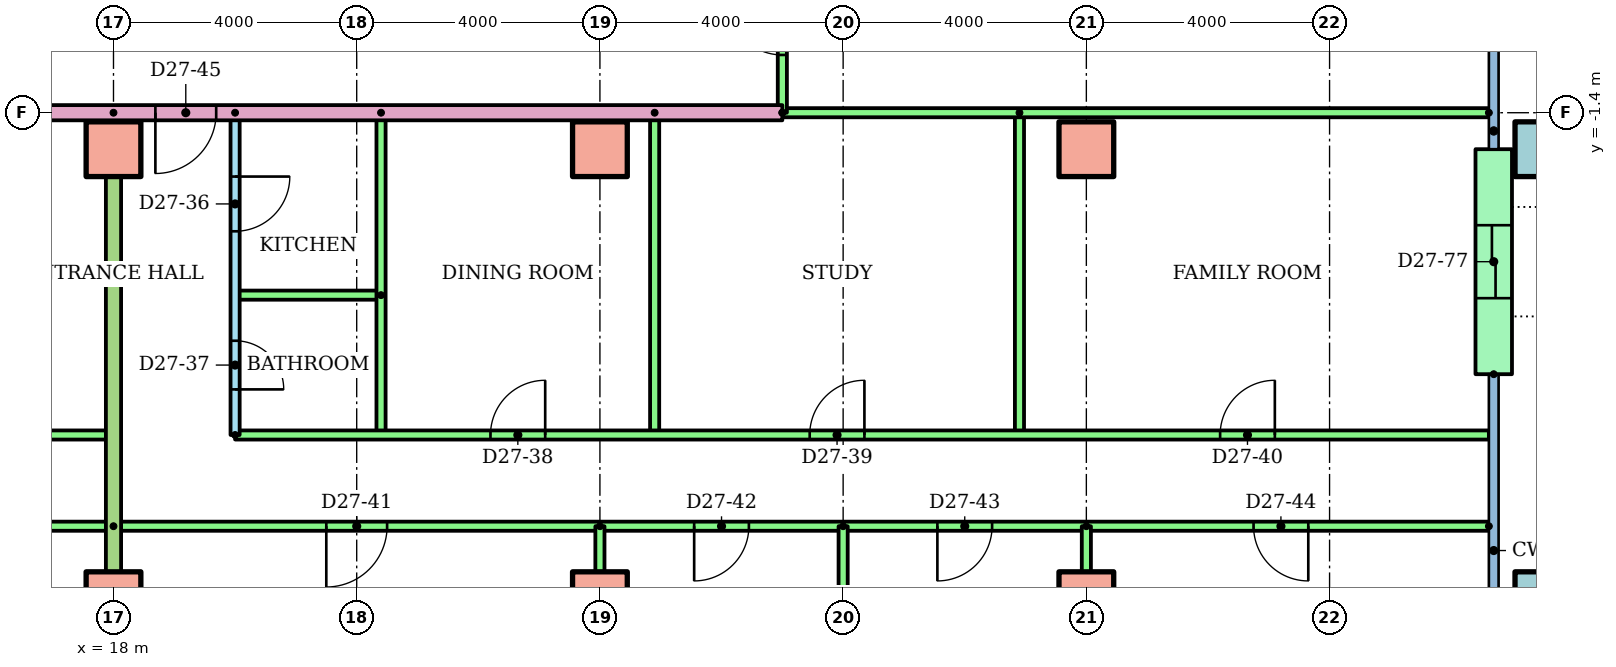
"""IFC4 building model, lengths in metres.
Left out: names, types, materials, properties, quantities, classifications, styles, units other than length and angle.
Written with IfcOpenShell. Run it as: python <this file> out.ifc"""

import sys

from ifc_helpers import new_model, si_unit, direction, frame, frame_2d, origin, origin_2d, place, context, subcontext, project, spatial, rectangle, hollow_rectangle, extrude, element, fill, save


model = new_model("IFC4")
c1 = context("Model", 3, precision=1e-05, world=origin(), true_north=direction((0.0, 1.0)))
c2 = subcontext(c1, "Body", "Model", "MODEL_VIEW")
j1 = project(units=[si_unit("LENGTHUNIT", "METRE"), si_unit("PLANEANGLEUNIT", "RADIAN")], contexts=[c1])
p1 = place(None, origin())
s1 = spatial("IfcSite", under=j1, at=p1, CompositionType="ELEMENT")
p2 = place(p1, origin())
s2 = spatial("IfcBuilding", under=s1, at=p2, CompositionType="ELEMENT")
p3 = place(p2, frame((0.0, 0.0, 103.1)))
s3 = spatial("IfcBuildingStorey", under=s2, at=p3, CompositionType="ELEMENT", Elevation=103.1)
for number, where in (
    (1, (18.0, -9.4, 0.0)),
    (2, (26.0, -9.4, 0.0)),
    (3, (34.0, -9.4, 0.0)),
):
    element("IfcColumn", number, at=place(p3, frame(where)), inside=s3, PredefinedType="COLUMN", context=c2, shape_type="SweptSolid", body=[
        extrude(rectangle(XDim=0.9, YDim=0.9, at=origin_2d()), origin(), (0.0, 0.0, 1.0), 3.2),
    ])
p4 = place(p3, frame((41.5, -9.4, 0.0)))
e4 = element("IfcColumn", 4, at=p4, inside=s3, PredefinedType="COLUMN", context=c2, shape_type="SweptSolid", body=[
    extrude(hollow_rectangle(XDim=0.9, YDim=0.9, WallThickness=0.045, at=origin_2d()), origin(), (0.0, 0.0, 1.0), 3.2),
])
for number, where in (
    (5, (18.0, -2.0, 0.0)),
    (6, (26.0, -2.0, 0.0)),
    (7, (34.0, -2.0, 0.0)),
):
    element("IfcColumn", number, at=place(p3, frame(where)), inside=s3, PredefinedType="COLUMN", context=c2, shape_type="SweptSolid", body=[
        extrude(rectangle(XDim=0.9, YDim=0.9, at=origin_2d()), origin(), (0.0, 0.0, 1.0), 3.2),
    ])
p5 = place(p3, frame((41.5, -2.0, 0.0)))
e8 = element("IfcColumn", 8, at=p5, inside=s3, PredefinedType="COLUMN", context=c2, shape_type="SweptSolid", body=[
    extrude(hollow_rectangle(XDim=0.9, YDim=0.9, WallThickness=0.045, at=origin_2d()), origin(), (0.0, 0.0, 1.0), 3.2),
])
p6 = place(p3, frame((40.7, -5.7, 0.0), z_axis=(0.0, 0.0, 1.0), x_axis=(0.0, 1.0, 0.0)))
e9 = element("IfcWall", 9, at=p6, inside=s3, PredefinedType="STANDARD", context=c2, shape_type="SweptSolid", body=[
    extrude(rectangle(XDim=3.7, YDim=0.6, at=frame_2d((1.85, 0.0))), origin(), (0.0, 0.0, 1.0), 2.8),
])
p7 = place(p6, frame((1.25, 0.0, 0.0)))
e10 = element("IfcOpeningElement", 10, at=p7, cuts=e9, PredefinedType="OPENING", context=c2, shape_type="SweptSolid", body=[
    extrude(rectangle(XDim=1.2, YDim=2.1, at=frame_2d((0.6, 1.05))), frame((0.0, 0.31, 0.0), z_axis=(0.0, -1.0, 0.0), x_axis=(1.0, 0.0, 0.0)), (0.0, 0.0, 1.0), 0.62),
])
p8 = place(p3, frame((-4.0, -6.7, 0.0)))
e11 = element("IfcWall", 11, at=p8, inside=s3, PredefinedType="PARTITIONING", context=c2, shape_type="SweptSolid", body=[
    extrude(rectangle(XDim=22.0, YDim=0.15, at=frame_2d((11.0, 0.0))), origin(), (0.0, 0.0, 1.0), 2.4),
])
p9 = place(p8, frame((4.45, 0.0, 0.0)))
e12 = element("IfcOpeningElement", 12, at=p9, cuts=e11, PredefinedType="OPENING", context=c2, shape_type="SweptSolid", body=[
    extrude(rectangle(XDim=0.9, YDim=2.1, at=frame_2d((0.45, 1.05))), frame((0.0, 0.085, 0.0), z_axis=(0.0, -1.0, 0.0), x_axis=(1.0, 0.0, 0.0)), (0.0, 0.0, 1.0), 0.17),
])
p10 = place(p8, frame((10.2, 0.0, 0.0)))
e13 = element("IfcOpeningElement", 13, at=p10, cuts=e11, PredefinedType="OPENING", context=c2, shape_type="SweptSolid", body=[
    extrude(rectangle(XDim=0.9, YDim=2.1, at=frame_2d((0.45, 1.05))), frame((0.0, 0.085, 0.0), z_axis=(0.0, -1.0, 0.0), x_axis=(1.0, 0.0, 0.0)), (0.0, 0.0, 1.0), 0.17),
])
p11 = place(p8, frame((17.5, 0.0, 0.0)))
e14 = element("IfcOpeningElement", 14, at=p11, cuts=e11, PredefinedType="OPENING", context=c2, shape_type="SweptSolid", body=[
    extrude(rectangle(XDim=0.9, YDim=2.1, at=frame_2d((0.45, 1.05))), frame((0.0, 0.085, 0.0), z_axis=(0.0, -1.0, 0.0), x_axis=(1.0, 0.0, 0.0)), (0.0, 0.0, 1.0), 0.17),
])
p12 = place(p3, frame((18.0, -8.2, 0.0), z_axis=(0.0, 0.0, 1.0), x_axis=(-1.0, 0.0, 0.0)))
e15 = element("IfcWall", 15, at=p12, inside=s3, PredefinedType="PARTITIONING", context=c2, shape_type="SweptSolid", body=[
    extrude(rectangle(XDim=24.0, YDim=0.15, at=frame_2d((12.0, 0.0))), origin(), (0.0, 0.0, 1.0), 2.4),
])
p13 = place(p12, frame((21.55, 0.0, 0.0)))
e16 = element("IfcOpeningElement", 16, at=p13, cuts=e15, PredefinedType="OPENING", context=c2, shape_type="SweptSolid", body=[
    extrude(rectangle(XDim=0.9, YDim=2.1, at=frame_2d((0.45, 1.05))), frame((0.0, 0.085, 0.0), z_axis=(0.0, -1.0, 0.0), x_axis=(1.0, 0.0, 0.0)), (0.0, 0.0, 1.0), 0.17),
])
p14 = place(p12, frame((17.55, 0.0, 0.0)))
e17 = element("IfcOpeningElement", 17, at=p14, cuts=e15, PredefinedType="OPENING", context=c2, shape_type="SweptSolid", body=[
    extrude(rectangle(XDim=0.9, YDim=2.1, at=frame_2d((0.45, 1.05))), frame((0.0, 0.085, 0.0), z_axis=(0.0, -1.0, 0.0), x_axis=(1.0, 0.0, 0.0)), (0.0, 0.0, 1.0), 0.17),
])
p15 = place(p12, frame((13.55, 0.0, 0.0)))
e18 = element("IfcOpeningElement", 18, at=p15, cuts=e15, PredefinedType="OPENING", context=c2, shape_type="SweptSolid", body=[
    extrude(rectangle(XDim=0.9, YDim=2.1, at=frame_2d((0.45, 1.05))), frame((0.0, 0.085, 0.0), z_axis=(0.0, -1.0, 0.0), x_axis=(1.0, 0.0, 0.0)), (0.0, 0.0, 1.0), 0.17),
])
p16 = place(p12, frame((9.55, 0.0, 0.0)))
e19 = element("IfcOpeningElement", 19, at=p16, cuts=e15, PredefinedType="OPENING", context=c2, shape_type="SweptSolid", body=[
    extrude(rectangle(XDim=0.9, YDim=2.1, at=frame_2d((0.45, 1.05))), frame((0.0, 0.085, 0.0), z_axis=(0.0, -1.0, 0.0), x_axis=(1.0, 0.0, 0.0)), (0.0, 0.0, 1.0), 0.17),
])
p17 = place(p12, frame((3.5, 0.0, 0.0)))
e20 = element("IfcOpeningElement", 20, at=p17, cuts=e15, PredefinedType="OPENING", context=c2, shape_type="SweptSolid", body=[
    extrude(rectangle(XDim=1.0, YDim=2.1, at=frame_2d((0.5, 1.05))), frame((0.0, 0.085, 0.0), z_axis=(0.0, -1.0, 0.0), x_axis=(1.0, 0.0, 0.0)), (0.0, 0.0, 1.0), 0.17),
])
p18 = place(p3, frame((20.0, -1.4, 0.0), z_axis=(0.0, 0.0, 1.0), x_axis=(0.0, -1.0, 0.0)))
e21 = element("IfcWall", 21, at=p18, inside=s3, PredefinedType="PARTITIONING", context=c2, shape_type="SweptSolid", body=[
    extrude(rectangle(XDim=5.3, YDim=0.15, at=frame_2d((2.65, 0.0))), origin(), (0.0, 0.0, 1.0), 2.4),
])
p19 = place(p18, frame((1.05, 0.0, 0.0)))
e22 = element("IfcOpeningElement", 22, at=p19, cuts=e21, PredefinedType="OPENING", context=c2, shape_type="SweptSolid", body=[
    extrude(rectangle(XDim=0.9, YDim=2.1, at=frame_2d((0.45, 1.05))), frame((0.0, 0.085, 0.0), z_axis=(0.0, -1.0, 0.0), x_axis=(1.0, 0.0, 0.0)), (0.0, 0.0, 1.0), 0.17),
])
p20 = place(p18, frame((3.75, 0.0, 0.0)))
e23 = element("IfcOpeningElement", 23, at=p20, cuts=e21, PredefinedType="OPENING", context=c2, shape_type="SweptSolid", body=[
    extrude(rectangle(XDim=0.8, YDim=2.1, at=frame_2d((0.4, 1.05))), frame((0.0, 0.085, 0.0), z_axis=(0.0, -1.0, 0.0), x_axis=(1.0, 0.0, 0.0)), (0.0, 0.0, 1.0), 0.17),
])
p21 = place(p3, frame((22.4, -4.4, 0.0), z_axis=(0.0, 0.0, 1.0), x_axis=(-1.0, 0.0, 0.0)))
e24 = element("IfcWall", 24, at=p21, inside=s3, PredefinedType="PARTITIONING", context=c2, shape_type="SweptSolid", body=[
    extrude(rectangle(XDim=2.4, YDim=0.15, at=frame_2d((1.2, 0.0))), origin(), (0.0, 0.0, 1.0), 2.4),
])
for number, where, z_axis, x_axis in (
    (25, (22.4, -1.4, 0.0), (0.0, 0.0, 1.0), (0.0, -1.0, 0.0)),
    (26, (26.9, -1.4, 0.0), (0.0, 0.0, 1.0), (0.0, -1.0, 0.0)),
    (27, (32.9, -1.4, 0.0), (0.0, 0.0, 1.0), (0.0, -1.0, 0.0)),
):
    element("IfcWall", number, at=place(p3, frame(where, z_axis=z_axis, x_axis=x_axis)), inside=s3, PredefinedType="PARTITIONING", context=c2, shape_type="SweptSolid", body=[
        extrude(rectangle(XDim=5.3, YDim=0.15, at=frame_2d((2.65, 0.0))), origin(), (0.0, 0.0, 1.0), 2.4),
    ])
p22 = place(p3, frame((20.0, -6.7, 0.0)))
e28 = element("IfcWall", 28, at=p22, inside=s3, PredefinedType="PARTITIONING", context=c2, shape_type="SweptSolid", body=[
    extrude(rectangle(XDim=20.62, YDim=0.15, at=frame_2d((10.31, 0.0))), origin(), (0.0, 0.0, 1.0), 2.4),
])
p23 = place(p22, frame((4.2, 0.0, 0.0)))
e29 = element("IfcOpeningElement", 29, at=p23, cuts=e28, PredefinedType="OPENING", context=c2, shape_type="SweptSolid", body=[
    extrude(rectangle(XDim=0.9, YDim=2.1, at=frame_2d((0.45, 1.05))), frame((0.0, 0.085, 0.0), z_axis=(0.0, -1.0, 0.0), x_axis=(1.0, 0.0, 0.0)), (0.0, 0.0, 1.0), 0.17),
])
p24 = place(p22, frame((9.45, 0.0, 0.0)))
e30 = element("IfcOpeningElement", 30, at=p24, cuts=e28, PredefinedType="OPENING", context=c2, shape_type="SweptSolid", body=[
    extrude(rectangle(XDim=0.9, YDim=2.1, at=frame_2d((0.45, 1.05))), frame((0.0, 0.085, 0.0), z_axis=(0.0, -1.0, 0.0), x_axis=(1.0, 0.0, 0.0)), (0.0, 0.0, 1.0), 0.17),
])
p25 = place(p22, frame((16.2, 0.0, 0.0)))
e31 = element("IfcOpeningElement", 31, at=p25, cuts=e28, PredefinedType="OPENING", context=c2, shape_type="SweptSolid", body=[
    extrude(rectangle(XDim=0.9, YDim=2.1, at=frame_2d((0.45, 1.05))), frame((0.0, 0.085, 0.0), z_axis=(0.0, -1.0, 0.0), x_axis=(1.0, 0.0, 0.0)), (0.0, 0.0, 1.0), 0.17),
])
p26 = place(p3, frame((40.62, -8.2, 0.0), z_axis=(0.0, 0.0, 1.0), x_axis=(-1.0, 0.0, 0.0)))
e32 = element("IfcWall", 32, at=p26, inside=s3, PredefinedType="PARTITIONING", context=c2, shape_type="SweptSolid", body=[
    extrude(rectangle(XDim=22.62, YDim=0.15, at=frame_2d((11.31, 0.0))), origin(), (0.0, 0.0, 1.0), 2.4),
])
p27 = place(p26, frame((18.12, 0.0, 0.0)))
e33 = element("IfcOpeningElement", 33, at=p27, cuts=e32, PredefinedType="OPENING", context=c2, shape_type="SweptSolid", body=[
    extrude(rectangle(XDim=1.0, YDim=2.1, at=frame_2d((0.5, 1.05))), frame((0.0, 0.085, 0.0), z_axis=(0.0, -1.0, 0.0), x_axis=(1.0, 0.0, 0.0)), (0.0, 0.0, 1.0), 0.17),
])
p28 = place(p26, frame((12.17, 0.0, 0.0)))
e34 = element("IfcOpeningElement", 34, at=p28, cuts=e32, PredefinedType="OPENING", context=c2, shape_type="SweptSolid", body=[
    extrude(rectangle(XDim=0.9, YDim=2.1, at=frame_2d((0.45, 1.05))), frame((0.0, 0.085, 0.0), z_axis=(0.0, -1.0, 0.0), x_axis=(1.0, 0.0, 0.0)), (0.0, 0.0, 1.0), 0.17),
])
p29 = place(p26, frame((8.17, 0.0, 0.0)))
e35 = element("IfcOpeningElement", 35, at=p29, cuts=e32, PredefinedType="OPENING", context=c2, shape_type="SweptSolid", body=[
    extrude(rectangle(XDim=0.9, YDim=2.1, at=frame_2d((0.45, 1.05))), frame((0.0, 0.085, 0.0), z_axis=(0.0, -1.0, 0.0), x_axis=(1.0, 0.0, 0.0)), (0.0, 0.0, 1.0), 0.17),
])
p30 = place(p26, frame((2.97, 0.0, 0.0)))
e36 = element("IfcOpeningElement", 36, at=p30, cuts=e32, PredefinedType="OPENING", context=c2, shape_type="SweptSolid", body=[
    extrude(rectangle(XDim=0.9, YDim=2.1, at=frame_2d((0.45, 1.05))), frame((0.0, 0.085, 0.0), z_axis=(0.0, -1.0, 0.0), x_axis=(1.0, 0.0, 0.0)), (0.0, 0.0, 1.0), 0.17),
])
p31 = place(p3, frame((26.0, -8.2, 0.0), z_axis=(0.0, 0.0, 1.0), x_axis=(0.0, -1.0, 0.0)))
e37 = element("IfcWall", 37, at=p31, inside=s3, PredefinedType="PARTITIONING", context=c2, shape_type="SweptSolid", body=[
    extrude(rectangle(XDim=8.01, YDim=0.15, at=frame_2d((4.005, 0.0))), origin(), (0.0, 0.0, 1.0), 2.4),
])
p32 = place(p3, frame((30.0, -8.2, 0.0), z_axis=(0.0, 0.0, 1.0), x_axis=(0.0, -1.0, 0.0)))
e38 = element("IfcWall", 38, at=p32, inside=s3, PredefinedType="PARTITIONING", context=c2, shape_type="SweptSolid", body=[
    extrude(rectangle(XDim=8.021, YDim=0.15, at=frame_2d((4.01, 0.0))), origin(), (0.0, 0.0, 1.0), 2.4),
])
p33 = place(p3, frame((34.0, -8.2, 0.0), z_axis=(0.0, 0.0, 1.0), x_axis=(0.0, -1.0, 0.0)))
e39 = element("IfcWall", 39, at=p33, inside=s3, PredefinedType="PARTITIONING", context=c2, shape_type="SweptSolid", body=[
    extrude(rectangle(XDim=8.01, YDim=0.15, at=frame_2d((4.005, 0.0))), origin(), (0.0, 0.0, 1.0), 2.4),
])
p34 = place(p3, frame((18.0, -1.4, 0.0), z_axis=(0.0, 0.0, 1.0), x_axis=(0.0, -1.0, 0.0)))
e40 = element("IfcWall", 40, at=p34, inside=s3, PredefinedType="PARTITIONING", context=c2, shape_type="SweptSolid", body=[
    extrude(rectangle(XDim=14.81, YDim=0.25, at=frame_2d((7.405, 0.0))), origin(), (0.0, 0.0, 1.0), 2.4),
])
p35 = place(p3, frame((29.0, -1.4, 0.0), z_axis=(0.0, 0.0, 1.0), x_axis=(-1.0, 0.0, 0.0)))
e41 = element("IfcWall", 41, at=p35, inside=s3, PredefinedType="PARTITIONING", context=c2, shape_type="SweptSolid", body=[
    extrude(rectangle(XDim=15.0, YDim=0.25, at=frame_2d((7.5, 0.0))), origin(), (0.0, 0.0, 1.0), 2.4),
])
p36 = place(p35, frame((9.311, 0.0, 0.0)))
e42 = element("IfcOpeningElement", 42, at=p36, cuts=e41, PredefinedType="OPENING", context=c2, shape_type="SweptSolid", body=[
    extrude(rectangle(XDim=1.0, YDim=2.1, at=frame_2d((0.5, 1.05))), frame((0.0, 0.135, 0.0), z_axis=(0.0, -1.0, 0.0), x_axis=(1.0, 0.0, 0.0)), (0.0, 0.0, 1.0), 0.27),
])
p37 = place(p3, frame((40.62, -1.4, 0.0), z_axis=(0.0, 0.0, 1.0), x_axis=(-1.0, 0.0, 0.0)))
e43 = element("IfcWall", 43, at=p37, inside=s3, PredefinedType="PARTITIONING", context=c2, shape_type="SweptSolid", body=[
    extrude(rectangle(XDim=11.62, YDim=0.15, at=frame_2d((5.81, 0.0))), origin(), (0.0, 0.0, 1.0), 2.4),
])
p38 = place(p3, frame((29.0, -1.4, 0.0), z_axis=(0.0, 0.0, 1.0), x_axis=(0.0, 1.0, 0.0)))
e44 = element("IfcWall", 44, at=p38, inside=s3, PredefinedType="PARTITIONING", context=c2, shape_type="SweptSolid", body=[
    extrude(rectangle(XDim=2.8, YDim=0.15, at=frame_2d((1.4, 0.0))), origin(), (0.0, 0.0, 1.0), 2.4),
])
p39 = place(p38, frame((0.95, 0.0, 0.0)))
e45 = element("IfcOpeningElement", 45, at=p39, cuts=e44, PredefinedType="OPENING", context=c2, shape_type="SweptSolid", body=[
    extrude(rectangle(XDim=0.9, YDim=2.1, at=frame_2d((0.45, 1.05))), frame((0.0, 0.085, 0.0), z_axis=(0.0, -1.0, 0.0), x_axis=(1.0, 0.0, 0.0)), (0.0, 0.0, 1.0), 0.17),
])
p40 = place(p19, origin())
e46 = element("IfcDoor", 46, at=p40, inside=s3, OperationType="SINGLE_SWING_LEFT", PredefinedType="DOOR", context=c2, shape_type="SweptSolid", body=[
    extrude(rectangle(XDim=0.9, YDim=2.1, at=frame_2d((0.45, 1.05))), frame((0.0, 0.025, 0.0), z_axis=(0.0, -1.0, 0.0), x_axis=(1.0, 0.0, 0.0)), (0.0, 0.0, 1.0), 0.05),
])
fill(e22, e46)
p41 = place(p20, origin())
e47 = element("IfcDoor", 47, at=p41, inside=s3, OperationType="SINGLE_SWING_RIGHT", PredefinedType="DOOR", context=c2, shape_type="SweptSolid", body=[
    extrude(rectangle(XDim=0.8, YDim=2.1, at=frame_2d((0.4, 1.05))), frame((0.0, 0.025, 0.0), z_axis=(0.0, -1.0, 0.0), x_axis=(1.0, 0.0, 0.0)), (0.0, 0.0, 1.0), 0.05),
])
fill(e23, e47)
p42 = place(p23, origin())
e48 = element("IfcDoor", 48, at=p42, inside=s3, OperationType="SINGLE_SWING_RIGHT", PredefinedType="DOOR", context=c2, shape_type="SweptSolid", body=[
    extrude(rectangle(XDim=0.9, YDim=2.1, at=frame_2d((0.45, 1.05))), frame((0.0, 0.025, 0.0), z_axis=(0.0, -1.0, 0.0), x_axis=(1.0, 0.0, 0.0)), (0.0, 0.0, 1.0), 0.05),
])
fill(e29, e48)
p43 = place(p24, origin())
e49 = element("IfcDoor", 49, at=p43, inside=s3, OperationType="SINGLE_SWING_RIGHT", PredefinedType="DOOR", context=c2, shape_type="SweptSolid", body=[
    extrude(rectangle(XDim=0.9, YDim=2.1, at=frame_2d((0.45, 1.05))), frame((0.0, 0.025, 0.0), z_axis=(0.0, -1.0, 0.0), x_axis=(1.0, 0.0, 0.0)), (0.0, 0.0, 1.0), 0.05),
])
fill(e30, e49)
p44 = place(p25, origin())
e50 = element("IfcDoor", 50, at=p44, inside=s3, OperationType="SINGLE_SWING_RIGHT", PredefinedType="DOOR", context=c2, shape_type="SweptSolid", body=[
    extrude(rectangle(XDim=0.9, YDim=2.1, at=frame_2d((0.45, 1.05))), frame((0.0, 0.025, 0.0), z_axis=(0.0, -1.0, 0.0), x_axis=(1.0, 0.0, 0.0)), (0.0, 0.0, 1.0), 0.05),
])
fill(e31, e50)
p45 = place(p27, origin())
e51 = element("IfcDoor", 51, at=p45, inside=s3, OperationType="SINGLE_SWING_RIGHT", PredefinedType="DOOR", context=c2, shape_type="SweptSolid", body=[
    extrude(rectangle(XDim=1.0, YDim=2.1, at=frame_2d((0.5, 1.05))), frame((0.0, 0.025, 0.0), z_axis=(0.0, -1.0, 0.0), x_axis=(1.0, 0.0, 0.0)), (0.0, 0.0, 1.0), 0.05),
])
fill(e33, e51)
p46 = place(p28, origin())
e52 = element("IfcDoor", 52, at=p46, inside=s3, OperationType="SINGLE_SWING_RIGHT", PredefinedType="DOOR", context=c2, shape_type="SweptSolid", body=[
    extrude(rectangle(XDim=0.9, YDim=2.1, at=frame_2d((0.45, 1.05))), frame((0.0, 0.025, 0.0), z_axis=(0.0, -1.0, 0.0), x_axis=(1.0, 0.0, 0.0)), (0.0, 0.0, 1.0), 0.05),
])
fill(e34, e52)
p47 = place(p29, origin())
e53 = element("IfcDoor", 53, at=p47, inside=s3, OperationType="SINGLE_SWING_RIGHT", PredefinedType="DOOR", context=c2, shape_type="SweptSolid", body=[
    extrude(rectangle(XDim=0.9, YDim=2.1, at=frame_2d((0.45, 1.05))), frame((0.0, 0.025, 0.0), z_axis=(0.0, -1.0, 0.0), x_axis=(1.0, 0.0, 0.0)), (0.0, 0.0, 1.0), 0.05),
])
fill(e35, e53)
p48 = place(p30, origin())
e54 = element("IfcDoor", 54, at=p48, inside=s3, OperationType="SINGLE_SWING_LEFT", PredefinedType="DOOR", context=c2, shape_type="SweptSolid", body=[
    extrude(rectangle(XDim=0.9, YDim=2.1, at=frame_2d((0.45, 1.05))), frame((0.0, 0.025, 0.0), z_axis=(0.0, -1.0, 0.0), x_axis=(1.0, 0.0, 0.0)), (0.0, 0.0, 1.0), 0.05),
])
fill(e36, e54)
p49 = place(p36, origin())
e55 = element("IfcDoor", 55, at=p49, inside=s3, OperationType="SINGLE_SWING_RIGHT", PredefinedType="DOOR", context=c2, shape_type="SweptSolid", body=[
    extrude(rectangle(XDim=1.0, YDim=2.1, at=frame_2d((0.5, 1.05))), frame((0.0, 0.025, 0.0), z_axis=(0.0, -1.0, 0.0), x_axis=(1.0, 0.0, 0.0)), (0.0, 0.0, 1.0), 0.05),
])
fill(e42, e55)
p50 = place(p39, origin())
e56 = element("IfcDoor", 56, at=p50, inside=s3, OperationType="SINGLE_SWING_RIGHT", PredefinedType="DOOR", context=c2, shape_type="SweptSolid", body=[
    extrude(rectangle(XDim=0.9, YDim=2.1, at=frame_2d((0.45, 1.05))), frame((0.0, 0.025, 0.0), z_axis=(0.0, -1.0, 0.0), x_axis=(1.0, 0.0, 0.0)), (0.0, 0.0, 1.0), 0.05),
])
fill(e45, e56)
p51 = place(p7, origin())
e57 = element("IfcDoor", 57, at=p51, inside=s3, OperationType="SLIDING_TO_LEFT", PredefinedType="DOOR", context=c2, shape_type="SweptSolid", body=[
    extrude(rectangle(XDim=1.2, YDim=2.1, at=frame_2d((0.6, 1.05))), frame((0.0, 0.025, 0.0), z_axis=(0.0, -1.0, 0.0), x_axis=(1.0, 0.0, 0.0)), (0.0, 0.0, 1.0), 0.05),
])
fill(e10, e57)
save(model, sys.argv[1])
